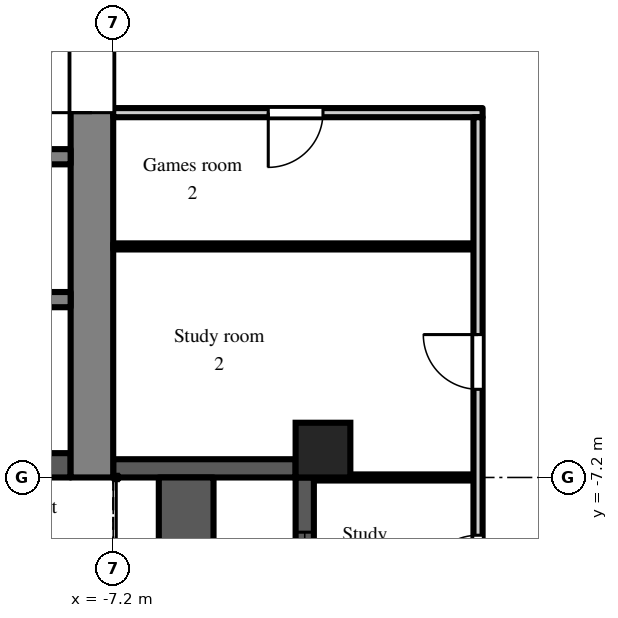
"""IFC4 building model, lengths in metres.
Left out: names, types, materials, properties, quantities, classifications, styles, units other than length and angle.
Written with IfcOpenShell. Run it as: python <this file> out.ifc"""

import sys

from ifc_helpers import new_model, si_unit, direction, frame, frame_2d, origin, origin_2d, place, context, subcontext, project, spatial, rectangle, extrude, element, fill, save


model = new_model("IFC4")
c1 = context("Model", 3, precision=1e-05, world=origin(), true_north=direction((0.0, 1.0)))
c2 = subcontext(c1, "Body", "Model", "MODEL_VIEW")
j1 = project(units=[si_unit("LENGTHUNIT", "METRE"), si_unit("PLANEANGLEUNIT", "RADIAN")], contexts=[c1])
p1 = place(None, origin())
s1 = spatial("IfcSite", under=j1, at=p1, CompositionType="ELEMENT")
p2 = place(p1, origin())
s2 = spatial("IfcBuilding", under=s1, at=p2, CompositionType="ELEMENT")
p3 = place(p2, frame((0.0, 0.0, 201.9)))
s3 = spatial("IfcBuildingStorey", under=s2, at=p3, CompositionType="ELEMENT", Elevation=201.9)
p4 = place(p3, frame((-3.75, -6.75, 0.0), z_axis=(0.0, 0.0, 1.0), x_axis=(1.0, 0.0, 0.0)))
e1 = element("IfcColumn", 1, at=p4, inside=s3, PredefinedType="COLUMN", context=c2, shape_type="SweptSolid", body=[
    extrude(rectangle(XDim=0.9, YDim=0.9, at=origin_2d()), origin(), (0.0, 0.0, 1.0), 3.0),
])
p5 = place(p3, frame((-7.2, -7.05, 0.0), z_axis=(0.0, 0.0, 1.0), x_axis=(1.0, 0.0, 0.0)))
e2 = element("IfcWall", 2, at=p5, inside=s3, PredefinedType="SOLIDWALL", context=c2, shape_type="SweptSolid", body=[
    extrude(rectangle(XDim=3.0, YDim=0.3, at=frame_2d((1.5, 0.0))), origin(), (0.0, 0.0, 1.0), 2.3),
])
p6 = place(p3, frame((-4.05, -7.2, 0.0), z_axis=(0.0, 0.0, 1.0), x_axis=(0.0, -1.0, 0.0)))
e3 = element("IfcWall", 3, at=p6, inside=s3, PredefinedType="SOLIDWALL", context=c2, shape_type="SweptSolid", body=[
    extrude(rectangle(XDim=7.2, YDim=0.3, at=frame_2d((3.6, 0.0))), origin(), (0.0, 0.0, 1.0), 2.3),
])
p7 = place(p6, frame((3.0, 0.0, 0.0)))
e4 = element("IfcOpeningElement", 4, at=p7, cuts=e3, PredefinedType="OPENING", context=c2, shape_type="SweptSolid", body=[
    extrude(rectangle(XDim=1.2, YDim=2.05, at=frame_2d((0.6, 1.025))), frame((0.0, 0.16, 0.0), z_axis=(0.0, -1.0, 0.0), x_axis=(1.0, 0.0, 0.0)), (0.0, 0.0, 1.0), 0.32),
])
p8 = place(p6, frame((0.9, 0.0, 0.2)))
e5 = element("IfcOpeningElement", 5, at=p8, cuts=e3, PredefinedType="OPENING", context=c2, shape_type="SweptSolid", body=[
    extrude(rectangle(XDim=1.8, YDim=1.85, at=frame_2d((0.9, 0.925))), frame((0.0, 0.16, 0.0), z_axis=(0.0, -1.0, 0.0), x_axis=(1.0, 0.0, 0.0)), (0.0, 0.0, 1.0), 0.32),
])
p9 = place(p6, frame((4.5, 0.0, 0.2)))
e6 = element("IfcOpeningElement", 6, at=p9, cuts=e3, PredefinedType="OPENING", context=c2, shape_type="SweptSolid", body=[
    extrude(rectangle(XDim=1.8, YDim=1.85, at=frame_2d((0.9, 0.925))), frame((0.0, 0.16, 0.0), z_axis=(0.0, -1.0, 0.0), x_axis=(1.0, 0.0, 0.0)), (0.0, 0.0, 1.0), 0.32),
])
p10 = place(p3, frame((-6.0, -14.4, 0.0), z_axis=(0.0, 0.0, 1.0), x_axis=(0.0, 1.0, 0.0)))
e7 = element("IfcWall", 7, at=p10, inside=s3, PredefinedType="PARAPET", context=c2, shape_type="SweptSolid", body=[
    extrude(rectangle(XDim=7.2, YDim=0.9, at=frame_2d((3.6, 0.0))), origin(), (0.0, 0.0, 1.0), 0.8),
])
p11 = place(p3, frame((-7.55, -7.2, 0.0), z_axis=(0.0, 0.0, 1.0), x_axis=(0.0, 1.0, 0.0)))
e8 = element("IfcWall", 8, at=p11, inside=s3, PredefinedType="SHEAR", context=c2, shape_type="SweptSolid", body=[
    extrude(rectangle(XDim=14.4, YDim=0.7, at=frame_2d((7.2, 0.0))), origin(), (0.0, 0.0, 1.0), 2.6),
])
p12 = place(p11, frame((6.0, 0.0, 0.0)))
e9 = element("IfcOpeningElement", 9, at=p12, cuts=e8, PredefinedType="OPENING", context=c2, shape_type="SweptSolid", body=[
    extrude(rectangle(XDim=2.4, YDim=2.2, at=frame_2d((1.2, 1.1))), frame((0.0, 0.36, 0.0), z_axis=(0.0, -1.0, 0.0), x_axis=(1.0, 0.0, 0.0)), (0.0, 0.0, 1.0), 0.72),
])
p13 = place(p3, frame((-7.9, -7.0, 0.0), z_axis=(0.0, 0.0, 1.0), x_axis=(-1.0, 0.0, 0.0)))
e10 = element("IfcWall", 10, at=p13, inside=s3, PredefinedType="SHEAR", context=c2, shape_type="SweptSolid", body=[
    extrude(rectangle(XDim=12.95, YDim=0.4, at=frame_2d((6.475, 0.0))), origin(), (0.0, 0.0, 1.0), 2.6),
])
p14 = place(p3, frame((-7.9, -1.925, 0.0), z_axis=(0.0, 0.0, 1.0), x_axis=(-1.0, 0.0, 0.0)))
e11 = element("IfcWall", 11, at=p14, inside=s3, PredefinedType="SHEAR", context=c2, shape_type="SweptSolid", body=[
    extrude(rectangle(XDim=12.95, YDim=0.25, at=frame_2d((6.475, 0.0))), origin(), (0.0, 0.0, 1.0), 2.6),
])
p15 = place(p14, frame((0.525, 0.0, 0.0)))
e12 = element("IfcOpeningElement", 12, at=p15, cuts=e11, PredefinedType="OPENING", context=c2, shape_type="SweptSolid", body=[
    extrude(rectangle(XDim=0.9, YDim=2.1, at=frame_2d((0.45, 1.05))), frame((0.0, 0.135, 0.0), z_axis=(0.0, -1.0, 0.0), x_axis=(1.0, 0.0, 0.0)), (0.0, 0.0, 1.0), 0.27),
])
p16 = place(p14, frame((2.625, 0.0, 0.0)))
e13 = element("IfcOpeningElement", 13, at=p16, cuts=e11, PredefinedType="OPENING", context=c2, shape_type="SweptSolid", body=[
    extrude(rectangle(XDim=1.1, YDim=2.1, at=frame_2d((0.55, 1.05))), frame((0.0, 0.135, 0.0), z_axis=(0.0, -1.0, 0.0), x_axis=(1.0, 0.0, 0.0)), (0.0, 0.0, 1.0), 0.27),
])
p17 = place(p14, frame((6.025, 0.0, 0.0)))
e14 = element("IfcOpeningElement", 14, at=p17, cuts=e11, PredefinedType="OPENING", context=c2, shape_type="SweptSolid", body=[
    extrude(rectangle(XDim=0.9, YDim=2.1, at=frame_2d((0.45, 1.05))), frame((0.0, 0.135, 0.0), z_axis=(0.0, -1.0, 0.0), x_axis=(1.0, 0.0, 0.0)), (0.0, 0.0, 1.0), 0.27),
])
p18 = place(p14, frame((10.425, 0.0, 0.0)))
e15 = element("IfcOpeningElement", 15, at=p18, cuts=e11, PredefinedType="OPENING", context=c2, shape_type="SweptSolid", body=[
    extrude(rectangle(XDim=0.9, YDim=2.1, at=frame_2d((0.45, 1.05))), frame((0.0, 0.135, 0.0), z_axis=(0.0, -1.0, 0.0), x_axis=(1.0, 0.0, 0.0)), (0.0, 0.0, 1.0), 0.27),
])
p19 = place(p3, frame((-7.9, -4.275, 0.0), z_axis=(0.0, 0.0, 1.0), x_axis=(-1.0, 0.0, 0.0)))
e16 = element("IfcWall", 16, at=p19, inside=s3, PredefinedType="SHEAR", context=c2, shape_type="SweptSolid", body=[
    extrude(rectangle(XDim=1.95, YDim=0.25, at=frame_2d((0.975, 0.0))), origin(), (0.0, 0.0, 1.0), 2.6),
])
p20 = place(p3, frame((-7.2, -3.4, 0.0), z_axis=(0.0, 0.0, 1.0), x_axis=(1.0, 0.0, 0.0)))
e17 = element("IfcWall", 17, at=p20, inside=s3, PredefinedType="PARTITIONING", context=c2, shape_type="SweptSolid", body=[
    extrude(rectangle(XDim=5.925, YDim=0.1, at=frame_2d((2.962, 0.0))), origin(), (0.0, 0.0, 1.0), 2.6),
])
p21 = place(p3, frame((-7.2, -1.2, 0.0), z_axis=(0.0, 0.0, 1.0), x_axis=(1.0, 0.0, 0.0)))
e18 = element("IfcWall", 18, at=p21, inside=s3, PredefinedType="PARTITIONING", context=c2, shape_type="SweptSolid", body=[
    extrude(rectangle(XDim=6.075, YDim=0.15, at=frame_2d((3.038, 0.0))), origin(), (0.0, 0.0, 1.0), 2.6),
])
p22 = place(p21, frame((2.55, 0.0, 0.0)))
e19 = element("IfcOpeningElement", 19, at=p22, cuts=e18, PredefinedType="OPENING", context=c2, shape_type="SweptSolid", body=[
    extrude(rectangle(XDim=0.9, YDim=2.1, at=frame_2d((0.45, 1.05))), frame((0.0, 0.085, 0.0), z_axis=(0.0, -1.0, 0.0), x_axis=(1.0, 0.0, 0.0)), (0.0, 0.0, 1.0), 0.17),
])
p23 = place(p3, frame((-3.9, -7.2, 0.0), z_axis=(0.0, 0.0, 1.0), x_axis=(1.0, 0.0, 0.0)))
e20 = element("IfcWall", 20, at=p23, inside=s3, PredefinedType="PARTITIONING", context=c2, shape_type="SweptSolid", body=[
    extrude(rectangle(XDim=2.625, YDim=0.1, at=frame_2d((1.312, 0.0))), origin(), (0.0, 0.0, 1.0), 2.6),
])
p24 = place(p3, frame((-1.2, -17.925, 0.0), z_axis=(0.0, 0.0, 1.0), x_axis=(0.0, 1.0, 0.0)))
e21 = element("IfcWall", 21, at=p24, inside=s3, PredefinedType="PARTITIONING", context=c2, shape_type="SweptSolid", body=[
    extrude(rectangle(XDim=16.65, YDim=0.15, at=frame_2d((8.325, 0.0))), origin(), (0.0, 0.0, 1.0), 2.6),
])
p25 = place(p24, frame((12.175, 0.0, 0.0)))
e22 = element("IfcOpeningElement", 22, at=p25, cuts=e21, PredefinedType="OPENING", context=c2, shape_type="SweptSolid", body=[
    extrude(rectangle(XDim=0.9, YDim=2.1, at=frame_2d((0.45, 1.05))), frame((0.0, 0.085, 0.0), z_axis=(0.0, -1.0, 0.0), x_axis=(1.0, 0.0, 0.0)), (0.0, 0.0, 1.0), 0.17),
])
p26 = place(p24, frame((8.875, 0.0, 0.0)))
e23 = element("IfcOpeningElement", 23, at=p26, cuts=e21, PredefinedType="OPENING", context=c2, shape_type="SweptSolid", body=[
    extrude(rectangle(XDim=0.9, YDim=2.1, at=frame_2d((0.45, 1.05))), frame((0.0, 0.085, 0.0), z_axis=(0.0, -1.0, 0.0), x_axis=(1.0, 0.0, 0.0)), (0.0, 0.0, 1.0), 0.17),
])
p27 = place(p24, frame((5.275, 0.0, 0.0)))
e24 = element("IfcOpeningElement", 24, at=p27, cuts=e21, PredefinedType="OPENING", context=c2, shape_type="SweptSolid", body=[
    extrude(rectangle(XDim=0.9, YDim=2.1, at=frame_2d((0.45, 1.05))), frame((0.0, 0.085, 0.0), z_axis=(0.0, -1.0, 0.0), x_axis=(1.0, 0.0, 0.0)), (0.0, 0.0, 1.0), 0.17),
])
p28 = place(p24, frame((2.325, 0.0, 0.0)))
e25 = element("IfcOpeningElement", 25, at=p28, cuts=e21, PredefinedType="OPENING", context=c2, shape_type="SweptSolid", body=[
    extrude(rectangle(XDim=1.0, YDim=2.1, at=frame_2d((0.5, 1.05))), frame((0.0, 0.085, 0.0), z_axis=(0.0, -1.0, 0.0), x_axis=(1.0, 0.0, 0.0)), (0.0, 0.0, 1.0), 0.17),
])
p29 = place(p8, origin())
e26 = element("IfcWindow", 26, at=p29, inside=s3, PartitioningType="SINGLE_PANEL", PredefinedType="WINDOW", context=c2, shape_type="SweptSolid", body=[
    extrude(rectangle(XDim=1.8, YDim=1.85, at=frame_2d((0.9, 0.925))), frame((0.0, 0.03, 0.0), z_axis=(0.0, -1.0, 0.0), x_axis=(1.0, 0.0, 0.0)), (0.0, 0.0, 1.0), 0.06),
])
fill(e5, e26)
p30 = place(p12, origin())
e27 = element("IfcDoor", 27, at=p30, inside=s3, OperationType="DOUBLE_DOOR_DOUBLE_SWING", PredefinedType="DOOR", context=c2, shape_type="SweptSolid", body=[
    extrude(rectangle(XDim=2.4, YDim=2.2, at=frame_2d((1.2, 1.1))), frame((0.0, 0.025, 0.0), z_axis=(0.0, -1.0, 0.0), x_axis=(1.0, 0.0, 0.0)), (0.0, 0.0, 1.0), 0.05),
])
fill(e9, e27)
p31 = place(p22, frame((0.9, 0.0, 0.0), z_axis=(0.0, 0.0, 1.0), x_axis=(-1.0, 0.0, 0.0)))
e28 = element("IfcDoor", 28, at=p31, inside=s3, OperationType="SINGLE_SWING_RIGHT", PredefinedType="DOOR", context=c2, shape_type="SweptSolid", body=[
    extrude(rectangle(XDim=0.9, YDim=2.1, at=frame_2d((0.45, 1.05))), frame((0.0, 0.025, 0.0), z_axis=(0.0, -1.0, 0.0), x_axis=(1.0, 0.0, 0.0)), (0.0, 0.0, 1.0), 0.05),
])
fill(e19, e28)
p32 = place(p25, origin())
e29 = element("IfcDoor", 29, at=p32, inside=s3, OperationType="SINGLE_SWING_RIGHT", PredefinedType="DOOR", context=c2, shape_type="SweptSolid", body=[
    extrude(rectangle(XDim=0.9, YDim=2.1, at=frame_2d((0.45, 1.05))), frame((0.0, 0.025, 0.0), z_axis=(0.0, -1.0, 0.0), x_axis=(1.0, 0.0, 0.0)), (0.0, 0.0, 1.0), 0.05),
])
fill(e22, e29)
p33 = place(p26, origin())
e30 = element("IfcDoor", 30, at=p33, inside=s3, OperationType="SINGLE_SWING_LEFT", PredefinedType="DOOR", context=c2, shape_type="SweptSolid", body=[
    extrude(rectangle(XDim=0.9, YDim=2.1, at=frame_2d((0.45, 1.05))), frame((0.0, 0.025, 0.0), z_axis=(0.0, -1.0, 0.0), x_axis=(1.0, 0.0, 0.0)), (0.0, 0.0, 1.0), 0.05),
])
fill(e23, e30)
save(model, sys.argv[1])
